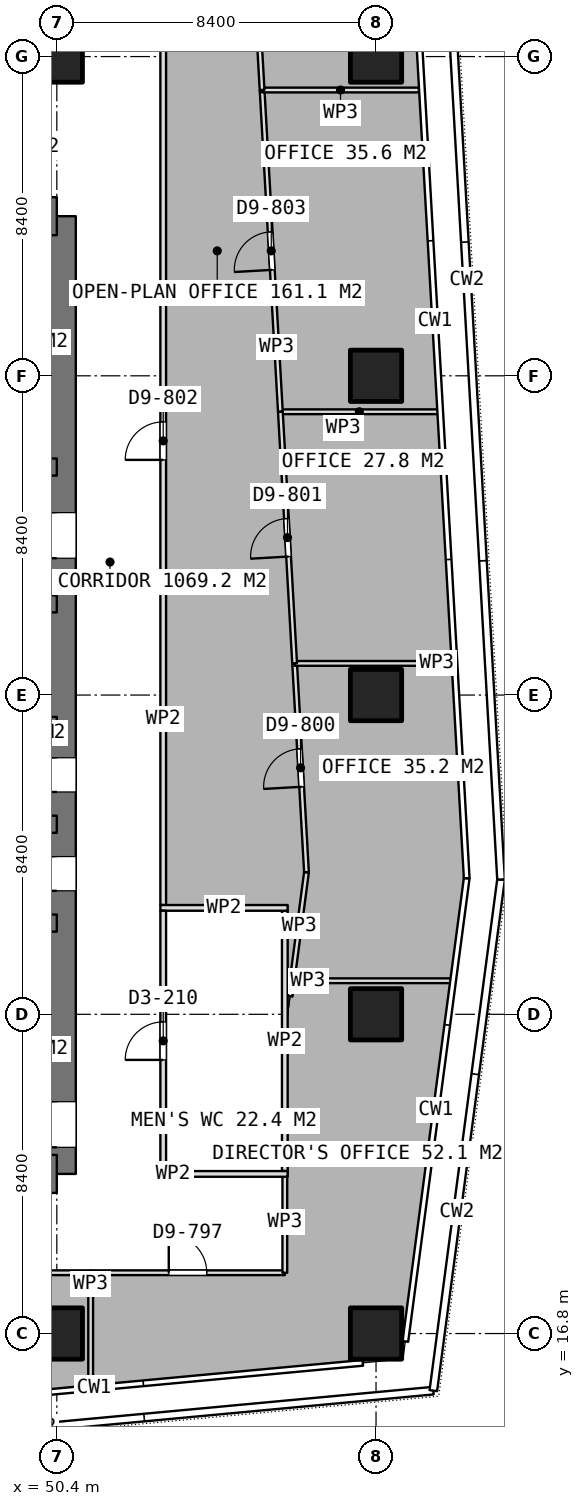
"""IFC4 building model, lengths in metres.
Left out: names, types, materials, properties, quantities, classifications, styles, units other than length and angle.
Written with IfcOpenShell. Run it as: python <this file> out.ifc"""

import sys

from ifc_helpers import new_model, si_unit, direction, frame, frame_2d, origin, origin_2d, place, context, subcontext, project, spatial, rectangle, extrude, element, fill, save


model = new_model("IFC4")
c1 = context("Model", 3, precision=1e-05, world=origin(), true_north=direction((0.0, 1.0)))
c2 = subcontext(c1, "Body", "Model", "MODEL_VIEW")
j1 = project(units=[si_unit("LENGTHUNIT", "METRE"), si_unit("PLANEANGLEUNIT", "RADIAN")], contexts=[c1])
p1 = place(None, origin())
s1 = spatial("IfcSite", under=j1, at=p1, CompositionType="ELEMENT")
p2 = place(p1, origin())
s2 = spatial("IfcBuilding", under=s1, at=p2, CompositionType="ELEMENT")
p3 = place(p2, frame((0.0, 0.0, 198.95)))
s3 = spatial("IfcBuildingStorey", under=s2, at=p3, CompositionType="ELEMENT", Elevation=198.95)
for number, where, z_axis, x_axis in (
    (1, (40.0, 21.0, 0.0), (0.0, 0.0, 1.0), (1.0, 0.0, 0.0)),
    (2, (40.0, 46.2, 0.0), (0.0, 0.0, 1.0), (1.0, 0.0, 0.0)),
):
    element("IfcWall", number, at=place(p3, frame(where, z_axis=z_axis, x_axis=x_axis)), inside=s3, PredefinedType="SHEAR", context=c2, shape_type="SweptSolid", body=[
        extrude(rectangle(XDim=10.4, YDim=1.0, at=frame_2d((5.2, 0.0))), origin(), (0.0, 0.0, 1.0), 3.75),
    ])
p4 = place(p3, frame((50.4, 21.0, 0.0), z_axis=(0.0, 0.0, 1.0), x_axis=(0.0, 1.0, 0.0)))
e3 = element("IfcWall", 3, at=p4, inside=s3, PredefinedType="SHEAR", context=c2, shape_type="SweptSolid", body=[
    extrude(rectangle(XDim=25.2, YDim=1.0, at=frame_2d((12.6, 0.0))), origin(), (0.0, 0.0, 1.0), 3.75),
])
p5 = place(p4, frame((16.2, 0.0, 0.0)))
e4 = element("IfcOpeningElement", 4, at=p5, cuts=e3, PredefinedType="OPENING", context=c2, shape_type="SweptSolid", body=[
    extrude(rectangle(XDim=1.2, YDim=2.1, at=frame_2d((0.6, 1.05))), frame((0.0, 0.51, 0.0), z_axis=(0.0, -1.0, 0.0), x_axis=(1.0, 0.0, 0.0)), (0.0, 0.0, 1.0), 1.02),
])
p6 = place(p4, frame((10.05, 0.0, 0.0)))
e5 = element("IfcOpeningElement", 5, at=p6, cuts=e3, PredefinedType="OPENING", context=c2, shape_type="SweptSolid", body=[
    extrude(rectangle(XDim=0.9, YDim=2.1, at=frame_2d((0.45, 1.05))), frame((0.0, 0.51, 0.0), z_axis=(0.0, -1.0, 0.0), x_axis=(1.0, 0.0, 0.0)), (0.0, 0.0, 1.0), 1.02),
])
p7 = place(p4, frame((7.45, 0.0, 0.0)))
e6 = element("IfcOpeningElement", 6, at=p7, cuts=e3, PredefinedType="OPENING", context=c2, shape_type="SweptSolid", body=[
    extrude(rectangle(XDim=0.9, YDim=2.1, at=frame_2d((0.45, 1.05))), frame((0.0, 0.51, 0.0), z_axis=(0.0, -1.0, 0.0), x_axis=(1.0, 0.0, 0.0)), (0.0, 0.0, 1.0), 1.02),
])
p8 = place(p4, frame((0.7, 0.0, 0.0)))
e7 = element("IfcOpeningElement", 7, at=p8, cuts=e3, PredefinedType="OPENING", context=c2, shape_type="SweptSolid", body=[
    extrude(rectangle(XDim=1.2, YDim=2.1, at=frame_2d((0.6, 1.05))), frame((0.0, 0.51, 0.0), z_axis=(0.0, -1.0, 0.0), x_axis=(1.0, 0.0, 0.0)), (0.0, 0.0, 1.0), 1.02),
])
for number, where, z_axis, x_axis in (
    (8, (43.8, 27.6, 0.0), (0.0, 0.0, 1.0), (1.0, 0.0, 0.0)),
    (9, (43.8, 30.2, 0.0), (0.0, 0.0, 1.0), (1.0, 0.0, 0.0)),
    (10, (43.8, 32.8, 0.0), (0.0, 0.0, 1.0), (1.0, 0.0, 0.0)),
):
    element("IfcWall", number, at=place(p3, frame(where, z_axis=z_axis, x_axis=x_axis)), inside=s3, PredefinedType="SHEAR", context=c2, shape_type="SweptSolid", body=[
        extrude(rectangle(XDim=6.6, YDim=0.45, at=frame_2d((3.3, 0.0))), origin(), (0.0, 0.0, 1.0), 3.75),
    ])
p9 = place(p3, frame((43.8, 36.0, 0.0), z_axis=(0.0, 0.0, 1.0), x_axis=(1.0, 0.0, 0.0)))
e11 = element("IfcWall", 11, at=p9, inside=s3, PredefinedType="SHEAR", context=c2, shape_type="SweptSolid", body=[
    extrude(rectangle(XDim=6.6, YDim=0.45, at=frame_2d((3.3, 0.0))), origin(), (0.0, 0.0, 1.0), 3.75),
])
p10 = place(p9, frame((2.65, 0.0, 0.0)))
e12 = element("IfcOpeningElement", 12, at=p10, cuts=e11, PredefinedType="OPENING", context=c2, shape_type="SweptSolid", body=[
    extrude(rectangle(XDim=1.3, YDim=2.1, at=frame_2d((0.65, 1.05))), frame((0.0, 0.235, 0.0), z_axis=(0.0, -1.0, 0.0), x_axis=(1.0, 0.0, 0.0)), (0.0, 0.0, 1.0), 0.47),
])
p11 = place(p3, frame((43.8, 39.6, 0.0), z_axis=(0.0, 0.0, 1.0), x_axis=(1.0, 0.0, 0.0)))
e13 = element("IfcWall", 13, at=p11, inside=s3, PredefinedType="SHEAR", context=c2, shape_type="SweptSolid", body=[
    extrude(rectangle(XDim=6.6, YDim=0.45, at=frame_2d((3.3, 0.0))), origin(), (0.0, 0.0, 1.0), 3.75),
])
p12 = place(p11, frame((0.425, 0.0, 0.0)))
e14 = element("IfcOpeningElement", 14, at=p12, cuts=e13, PredefinedType="OPENING", context=c2, shape_type="SweptSolid", body=[
    extrude(rectangle(XDim=1.2, YDim=2.1, at=frame_2d((0.6, 1.05))), frame((0.0, 0.235, 0.0), z_axis=(0.0, -1.0, 0.0), x_axis=(1.0, 0.0, 0.0)), (0.0, 0.0, 1.0), 0.47),
])
for number, where, z_axis, x_axis in (
    (15, (50.4, 16.8, 0.0), (0.0, 0.0, 1.0), (1.0, 0.0, 0.0)),
    (16, (50.4, 50.4, 0.0), (0.0, 0.0, 1.0), (1.0, 0.0, 0.0)),
    (17, (58.8, 16.8, 0.0), (0.0, 0.0, 1.0), (1.0, 0.0, 0.0)),
    (18, (58.8, 25.2, 0.0), (0.0, 0.0, 1.0), (1.0, 0.0, 0.0)),
    (19, (58.8, 33.6, 0.0), (0.0, 0.0, 1.0), (1.0, 0.0, 0.0)),
    (20, (58.8, 42.0, 0.0), (0.0, 0.0, 1.0), (1.0, 0.0, 0.0)),
    (21, (58.8, 50.4, 0.0), (0.0, 0.0, 1.0), (1.0, 0.0, 0.0)),
):
    element("IfcColumn", number, at=place(p3, frame(where, z_axis=z_axis, x_axis=x_axis)), inside=s3, PredefinedType="COLUMN", context=c2, shape_type="SweptSolid", body=[
        extrude(rectangle(XDim=1.35, YDim=1.35, at=origin_2d()), origin(), (0.0, 0.0, 1.0), 3.75),
    ])
for number, where, z_axis, x_axis in (
    (22, (53.125, 21.0, 0.0), (0.0, 0.0, 1.0), (1.0, 0.0, 0.0)),
    (23, (53.125, 28.0, 0.0), (0.0, 0.0, 1.0), (1.0, 0.0, 0.0)),
):
    element("IfcWall", number, at=place(p3, frame(where, z_axis=z_axis, x_axis=x_axis)), inside=s3, PredefinedType="PARTITIONING", context=c2, shape_type="SweptSolid", body=[
        extrude(rectangle(XDim=3.35, YDim=0.15, at=frame_2d((1.675, 0.0))), origin(), (0.0, 0.0, 1.0), 3.5),
    ])
p13 = place(p3, frame((53.2, 21.075, 0.0), z_axis=(0.0, 0.0, 1.0), x_axis=(0.0, 1.0, 0.0)))
e24 = element("IfcWall", 24, at=p13, inside=s3, PredefinedType="PARTITIONING", context=c2, shape_type="SweptSolid", body=[
    extrude(rectangle(XDim=6.85, YDim=0.15, at=frame_2d((3.425, 0.0))), origin(), (0.0, 0.0, 1.0), 3.5),
])
p14 = place(p13, frame((2.925, 0.0, 0.0)))
e25 = element("IfcOpeningElement", 25, at=p14, cuts=e24, PredefinedType="OPENING", context=c2, shape_type="SweptSolid", body=[
    extrude(rectangle(XDim=1.0, YDim=2.1, at=frame_2d((0.5, 1.05))), frame((0.0, 0.085, 0.0), z_axis=(0.0, -1.0, 0.0), x_axis=(1.0, 0.0, 0.0)), (0.0, 0.0, 1.0), 0.17),
])
p15 = place(p3, frame((56.4, 21.075, 0.0), z_axis=(0.0, 0.0, 1.0), x_axis=(0.0, 1.0, 0.0)))
e26 = element("IfcWall", 26, at=p15, inside=s3, PredefinedType="PARTITIONING", context=c2, shape_type="SweptSolid", body=[
    extrude(rectangle(XDim=6.85, YDim=0.15, at=frame_2d((3.425, 0.0))), origin(), (0.0, 0.0, 1.0), 3.5),
])
p16 = place(p3, frame((51.291, 15.442, 0.0), z_axis=(0.0, 0.0, 1.0), x_axis=(0.0, 1.0, 0.0)))
e27 = element("IfcWall", 27, at=p16, inside=s3, PredefinedType="PARTITIONING", context=c2, shape_type="SweptSolid", body=[
    extrude(rectangle(XDim=2.958, YDim=0.125, at=frame_2d((1.479, 0.0))), origin(), (0.0, 0.0, 1.0), 3.5),
])
p17 = place(p3, frame((51.291, 18.4, 0.0), z_axis=(0.0, 0.0, 1.0), x_axis=(1.0, 0.0, 0.0)))
e28 = element("IfcWall", 28, at=p17, inside=s3, PredefinedType="PARTITIONING", context=c2, shape_type="SweptSolid", body=[
    extrude(rectangle(XDim=5.109, YDim=0.125, at=frame_2d((2.554, 0.0))), origin(), (0.0, 0.0, 1.0), 3.5),
])
p18 = place(p17, frame((2.055, 0.0, 0.0)))
e29 = element("IfcOpeningElement", 29, at=p18, cuts=e28, PredefinedType="OPENING", context=c2, shape_type="SweptSolid", body=[
    extrude(rectangle(XDim=1.0, YDim=2.1, at=frame_2d((0.5, 1.05))), frame((0.0, 0.073, 0.0), z_axis=(0.0, -1.0, 0.0), x_axis=(1.0, 0.0, 0.0)), (0.0, 0.0, 1.0), 0.145),
])
p19 = place(p3, frame((56.4, 18.4, 0.0), z_axis=(0.0, 0.0, 1.0), x_axis=(0.0, 1.0, 0.0)))
e30 = element("IfcWall", 30, at=p19, inside=s3, PredefinedType="PARTITIONING", context=c2, shape_type="SweptSolid", body=[
    extrude(rectangle(XDim=2.675, YDim=0.125, at=frame_2d((1.337, 0.0))), origin(), (0.0, 0.0, 1.0), 3.5),
])
p20 = place(p3, frame((56.538, 25.675, 0.0), z_axis=(0.0, 0.0, 1.0), x_axis=(0.131114399239, 0.991367244926, 0.0)))
e31 = element("IfcWall", 31, at=p20, inside=s3, PredefinedType="PARTITIONING", context=c2, shape_type="SweptSolid", body=[
    extrude(rectangle(XDim=0.412, YDim=0.125, at=frame_2d((0.206, 0.0))), origin(), (0.0, 0.0, 1.0), 3.5),
])
p21 = place(p3, frame((56.592, 26.083, 0.0), z_axis=(0.0, 0.0, 1.0), x_axis=(1.0, 0.0, 0.0)))
e32 = element("IfcWall", 32, at=p21, inside=s3, PredefinedType="PARTITIONING", context=c2, shape_type="SweptSolid", body=[
    extrude(rectangle(XDim=4.186, YDim=0.125, at=frame_2d((2.093, 0.0))), origin(), (0.0, 0.0, 1.0), 3.5),
])
p22 = place(p3, frame((56.592, 26.084, 0.0), z_axis=(0.0, 0.0, 1.0), x_axis=(0.131274902855, 0.991346004118, 0.0)))
e33 = element("IfcWall", 33, at=p22, inside=s3, PredefinedType="PARTITIONING", context=c2, shape_type="SweptSolid", body=[
    extrude(rectangle(XDim=2.879, YDim=0.125, at=frame_2d((1.439, 0.0))), origin(), (0.0, 0.0, 1.0), 3.5),
])
p23 = place(p3, frame((56.97, 28.938, 0.0), z_axis=(0.0, 0.0, 1.0), x_axis=(-0.056688504788, 0.998391913742, 0.0)))
e34 = element("IfcWall", 34, at=p23, inside=s3, PredefinedType="PARTITIONING", context=c2, shape_type="SweptSolid", body=[
    extrude(rectangle(XDim=5.504, YDim=0.125, at=frame_2d((2.752, 0.0))), origin(), (0.0, 0.0, 1.0), 3.5),
])
p24 = place(p23, frame((2.252, 0.0, 0.0)))
e35 = element("IfcOpeningElement", 35, at=p24, cuts=e34, PredefinedType="OPENING", context=c2, shape_type="SweptSolid", body=[
    extrude(rectangle(XDim=1.0, YDim=2.1, at=frame_2d((0.5, 1.05))), frame((0.0, 0.073, 0.0), z_axis=(0.0, -1.0, 0.0), x_axis=(1.0, 0.0, 0.0)), (0.0, 0.0, 1.0), 0.145),
])
p25 = place(p3, frame((56.658, 34.433, 0.0), z_axis=(0.0, 0.0, 1.0), x_axis=(1.0, 0.0, 0.0)))
e36 = element("IfcWall", 36, at=p25, inside=s3, PredefinedType="PARTITIONING", context=c2, shape_type="SweptSolid", body=[
    extrude(rectangle(XDim=4.157, YDim=0.125, at=frame_2d((2.079, 0.0))), origin(), (0.0, 0.0, 1.0), 3.5),
])
p26 = place(p3, frame((56.658, 34.434, 0.0), z_axis=(0.0, 0.0, 1.0), x_axis=(-0.056556940453, 0.998399375244, 0.0)))
e37 = element("IfcWall", 37, at=p26, inside=s3, PredefinedType="PARTITIONING", context=c2, shape_type="SweptSolid", body=[
    extrude(rectangle(XDim=6.63, YDim=0.125, at=frame_2d((3.315, 0.0))), origin(), (0.0, 0.0, 1.0), 3.5),
])
p27 = place(p26, frame((2.815, 0.0, 0.0)))
e38 = element("IfcOpeningElement", 38, at=p27, cuts=e37, PredefinedType="OPENING", context=c2, shape_type="SweptSolid", body=[
    extrude(rectangle(XDim=1.0, YDim=2.1, at=frame_2d((0.5, 1.05))), frame((0.0, 0.073, 0.0), z_axis=(0.0, -1.0, 0.0), x_axis=(1.0, 0.0, 0.0)), (0.0, 0.0, 1.0), 0.145),
])
p28 = place(p3, frame((56.283, 41.054, 0.0), z_axis=(0.0, 0.0, 1.0), x_axis=(1.0, 0.0, 0.0)))
e39 = element("IfcWall", 39, at=p28, inside=s3, PredefinedType="PARTITIONING", context=c2, shape_type="SweptSolid", body=[
    extrude(rectangle(XDim=4.156, YDim=0.125, at=frame_2d((2.078, 0.0))), origin(), (0.0, 0.0, 1.0), 3.5),
])
p29 = place(p3, frame((56.283, 41.055, 0.0), z_axis=(0.0, 0.0, 1.0), x_axis=(-0.056725059265, 0.998389837514, 0.0)))
e40 = element("IfcWall", 40, at=p29, inside=s3, PredefinedType="PARTITIONING", context=c2, shape_type="SweptSolid", body=[
    extrude(rectangle(XDim=8.479, YDim=0.125, at=frame_2d((4.239, 0.0))), origin(), (0.0, 0.0, 1.0), 3.5),
])
p30 = place(p29, frame((3.739, 0.0, 0.0)))
e41 = element("IfcOpeningElement", 41, at=p30, cuts=e40, PredefinedType="OPENING", context=c2, shape_type="SweptSolid", body=[
    extrude(rectangle(XDim=1.0, YDim=2.1, at=frame_2d((0.5, 1.05))), frame((0.0, 0.073, 0.0), z_axis=(0.0, -1.0, 0.0), x_axis=(1.0, 0.0, 0.0)), (0.0, 0.0, 1.0), 0.145),
])
p31 = place(p3, frame((55.802, 49.52, 0.0), z_axis=(0.0, 0.0, 1.0), x_axis=(1.0, 0.0, 0.0)))
e42 = element("IfcWall", 42, at=p31, inside=s3, PredefinedType="PARTITIONING", context=c2, shape_type="SweptSolid", body=[
    extrude(rectangle(XDim=4.127, YDim=0.125, at=frame_2d((2.063, 0.0))), origin(), (0.0, 0.0, 1.0), 3.5),
])
p32 = place(p3, frame((55.802, 49.521, 0.0), z_axis=(0.0, 0.0, 1.0), x_axis=(-0.056623192548, 0.998395620015, 0.0)))
e43 = element("IfcWall", 43, at=p32, inside=s3, PredefinedType="PARTITIONING", context=c2, shape_type="SweptSolid", body=[
    extrude(rectangle(XDim=7.188, YDim=0.125, at=frame_2d((3.594, 0.0))), origin(), (0.0, 0.0, 1.0), 3.5),
])
p33 = place(p32, frame((3.094, 0.0, 0.0)))
e44 = element("IfcOpeningElement", 44, at=p33, cuts=e43, PredefinedType="OPENING", context=c2, shape_type="SweptSolid", body=[
    extrude(rectangle(XDim=1.0, YDim=2.1, at=frame_2d((0.5, 1.05))), frame((0.0, 0.073, 0.0), z_axis=(0.0, -1.0, 0.0), x_axis=(1.0, 0.0, 0.0)), (0.0, 0.0, 1.0), 0.145),
])
p34 = place(p3, frame((53.2, 28.075, 0.0), z_axis=(0.0, 0.0, 1.0), x_axis=(0.0, 1.0, 0.0)))
e45 = element("IfcWall", 45, at=p34, inside=s3, PredefinedType="PARTITIONING", context=c2, shape_type="SweptSolid", body=[
    extrude(rectangle(XDim=24.5, YDim=0.15, at=frame_2d((12.25, 0.0))), origin(), (0.0, 0.0, 1.0), 3.5),
])
p35 = place(p34, frame((11.713, 0.0, 0.0)))
e46 = element("IfcOpeningElement", 46, at=p35, cuts=e45, PredefinedType="OPENING", context=c2, shape_type="SweptSolid", body=[
    extrude(rectangle(XDim=1.0, YDim=2.1, at=frame_2d((0.5, 1.05))), frame((0.0, 0.085, 0.0), z_axis=(0.0, -1.0, 0.0), x_axis=(1.0, 0.0, 0.0)), (0.0, 0.0, 1.0), 0.17),
])
p36 = place(p3, frame((35.508, 18.4, 0.0), z_axis=(0.0, 0.0, 1.0), x_axis=(1.0, 0.0, 0.0)))
e47 = element("IfcWall", 47, at=p36, inside=s3, PredefinedType="PARTITIONING", context=c2, shape_type="SweptSolid", body=[
    extrude(rectangle(XDim=15.783, YDim=0.125, at=frame_2d((7.892, 0.0))), origin(), (0.0, 0.0, 1.0), 3.5),
])
p37 = place(p36, frame((7.291, 0.0, 0.0)))
e48 = element("IfcOpeningElement", 48, at=p37, cuts=e47, PredefinedType="OPENING", context=c2, shape_type="SweptSolid", body=[
    extrude(rectangle(XDim=1.8, YDim=2.1, at=frame_2d((0.9, 1.05))), frame((0.0, 0.073, 0.0), z_axis=(0.0, -1.0, 0.0), x_axis=(1.0, 0.0, 0.0)), (0.0, 0.0, 1.0), 0.145),
])
p38 = place(p5, origin())
e49 = element("IfcDoor", 49, at=p38, inside=s3, OperationType="SINGLE_SWING_LEFT", PredefinedType="DOOR", context=c2, shape_type="SweptSolid", body=[
    extrude(rectangle(XDim=1.2, YDim=2.1, at=frame_2d((0.6, 1.05))), frame((0.0, 0.025, 0.0), z_axis=(0.0, -1.0, 0.0), x_axis=(1.0, 0.0, 0.0)), (0.0, 0.0, 1.0), 0.05),
])
fill(e4, e49)
p39 = place(p6, origin())
e50 = element("IfcDoor", 50, at=p39, inside=s3, OperationType="SINGLE_SWING_LEFT", PredefinedType="DOOR", context=c2, shape_type="SweptSolid", body=[
    extrude(rectangle(XDim=0.9, YDim=2.1, at=frame_2d((0.45, 1.05))), frame((0.0, 0.025, 0.0), z_axis=(0.0, -1.0, 0.0), x_axis=(1.0, 0.0, 0.0)), (0.0, 0.0, 1.0), 0.05),
])
fill(e5, e50)
p40 = place(p7, origin())
e51 = element("IfcDoor", 51, at=p40, inside=s3, OperationType="SINGLE_SWING_LEFT", PredefinedType="DOOR", context=c2, shape_type="SweptSolid", body=[
    extrude(rectangle(XDim=0.9, YDim=2.1, at=frame_2d((0.45, 1.05))), frame((0.0, 0.025, 0.0), z_axis=(0.0, -1.0, 0.0), x_axis=(1.0, 0.0, 0.0)), (0.0, 0.0, 1.0), 0.05),
])
fill(e6, e51)
p41 = place(p14, origin())
e52 = element("IfcDoor", 52, at=p41, inside=s3, OperationType="SINGLE_SWING_LEFT", PredefinedType="DOOR", context=c2, shape_type="SweptSolid", body=[
    extrude(rectangle(XDim=1.0, YDim=2.1, at=frame_2d((0.5, 1.05))), frame((0.0, 0.025, 0.0), z_axis=(0.0, -1.0, 0.0), x_axis=(1.0, 0.0, 0.0)), (0.0, 0.0, 1.0), 0.05),
])
fill(e25, e52)
p42 = place(p18, origin())
e53 = element("IfcDoor", 53, at=p42, inside=s3, OperationType="SINGLE_SWING_LEFT", PredefinedType="DOOR", context=c2, shape_type="SweptSolid", body=[
    extrude(rectangle(XDim=1.0, YDim=2.1, at=frame_2d((0.5, 1.05))), frame((0.0, 0.025, 0.0), z_axis=(0.0, -1.0, 0.0), x_axis=(1.0, 0.0, 0.0)), (0.0, 0.0, 1.0), 0.05),
])
fill(e29, e53)
p43 = place(p24, origin())
e54 = element("IfcDoor", 54, at=p43, inside=s3, OperationType="SINGLE_SWING_LEFT", PredefinedType="DOOR", context=c2, shape_type="SweptSolid", body=[
    extrude(rectangle(XDim=1.0, YDim=2.1, at=frame_2d((0.5, 1.05))), frame((0.0, 0.025, 0.0), z_axis=(0.0, -1.0, 0.0), x_axis=(1.0, 0.0, 0.0)), (0.0, 0.0, 1.0), 0.05),
])
fill(e35, e54)
p44 = place(p27, origin())
e55 = element("IfcDoor", 55, at=p44, inside=s3, OperationType="SINGLE_SWING_LEFT", PredefinedType="DOOR", context=c2, shape_type="SweptSolid", body=[
    extrude(rectangle(XDim=1.0, YDim=2.1, at=frame_2d((0.5, 1.05))), frame((0.0, 0.025, 0.0), z_axis=(0.0, -1.0, 0.0), x_axis=(1.0, 0.0, 0.0)), (0.0, 0.0, 1.0), 0.05),
])
fill(e38, e55)
p45 = place(p30, origin())
e56 = element("IfcDoor", 56, at=p45, inside=s3, OperationType="SINGLE_SWING_LEFT", PredefinedType="DOOR", context=c2, shape_type="SweptSolid", body=[
    extrude(rectangle(XDim=1.0, YDim=2.1, at=frame_2d((0.5, 1.05))), frame((0.0, 0.025, 0.0), z_axis=(0.0, -1.0, 0.0), x_axis=(1.0, 0.0, 0.0)), (0.0, 0.0, 1.0), 0.05),
])
fill(e41, e56)
p46 = place(p35, origin())
e57 = element("IfcDoor", 57, at=p46, inside=s3, OperationType="SINGLE_SWING_LEFT", PredefinedType="DOOR", context=c2, shape_type="SweptSolid", body=[
    extrude(rectangle(XDim=1.0, YDim=2.1, at=frame_2d((0.5, 1.05))), frame((0.0, 0.025, 0.0), z_axis=(0.0, -1.0, 0.0), x_axis=(1.0, 0.0, 0.0)), (0.0, 0.0, 1.0), 0.05),
])
fill(e46, e57)
p47 = place(p8, origin())
e58 = element("IfcDoor", 58, at=p47, inside=s3, OperationType="SINGLE_SWING_RIGHT", PredefinedType="DOOR", context=c2, shape_type="SweptSolid", body=[
    extrude(rectangle(XDim=1.2, YDim=2.1, at=frame_2d((0.6, 1.05))), frame((0.0, 0.025, 0.0), z_axis=(0.0, -1.0, 0.0), x_axis=(1.0, 0.0, 0.0)), (0.0, 0.0, 1.0), 0.05),
])
fill(e7, e58)
save(model, sys.argv[1])
